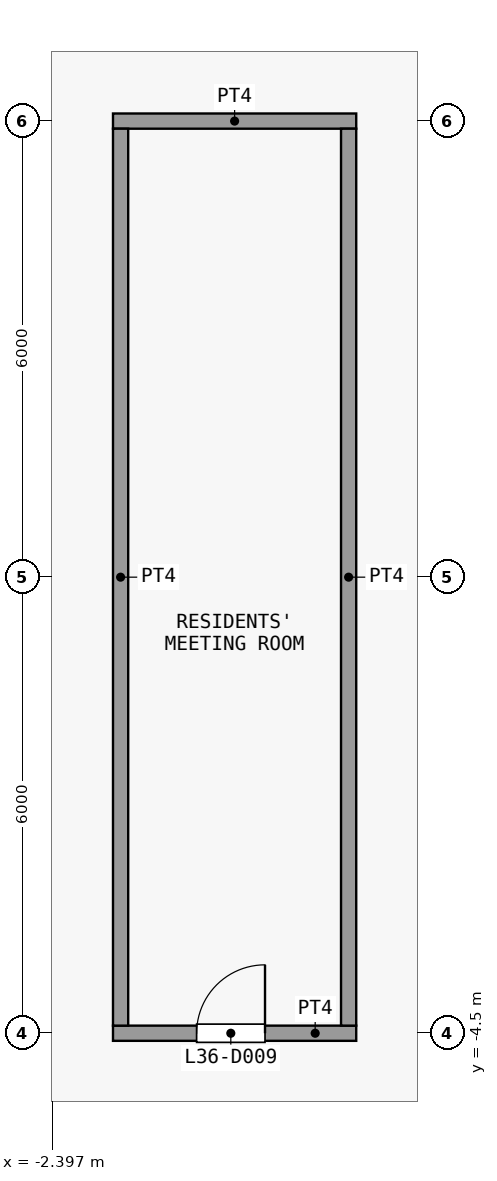
"""IFC4 building model, lengths in metres.
Left out: names, types, materials, properties, quantities, classifications, styles, units other than length and angle.
Written with IfcOpenShell. Run it as: python <this file> out.ifc"""

import sys

from ifc_helpers import new_model, si_unit, direction, frame, frame_2d, origin, place, context, subcontext, project, spatial, rectangle, extrude, element, fill, save


model = new_model("IFC4")
c1 = context("Model", 3, precision=1e-05, world=origin(), true_north=direction((0.0, 1.0)))
c2 = subcontext(c1, "Body", "Model", "MODEL_VIEW")
j1 = project(units=[si_unit("LENGTHUNIT", "METRE"), si_unit("PLANEANGLEUNIT", "RADIAN")], contexts=[c1])
p1 = place(None, origin())
s1 = spatial("IfcSite", under=j1, at=p1, CompositionType="ELEMENT")
p2 = place(p1, origin())
s2 = spatial("IfcBuilding", under=s1, at=p2, CompositionType="ELEMENT")
p3 = place(p2, frame((0.0, 0.0, 149.3)))
s3 = spatial("IfcBuildingStorey", under=s2, at=p3, CompositionType="ELEMENT", Elevation=149.3)
p4 = place(p3, frame((-1.6, -4.5, 0.0), z_axis=(0.0, 0.0, 1.0), x_axis=(1.0, 0.0, 0.0)))
e1 = element("IfcWall", 1, at=p4, inside=s3, PredefinedType="PARTITIONING", context=c2, shape_type="SweptSolid", body=[
    extrude(rectangle(XDim=3.2, YDim=0.2, at=frame_2d((1.6, 0.0))), origin(), (0.0, 0.0, 1.0), 3.3),
])
p5 = place(p4, frame((1.1, 0.0, 0.0)))
e2 = element("IfcOpeningElement", 2, at=p5, cuts=e1, PredefinedType="OPENING", context=c2, shape_type="SweptSolid", body=[
    extrude(rectangle(XDim=0.9, YDim=2.1, at=frame_2d((0.45, 1.05))), frame((0.0, 0.11, 0.0), z_axis=(0.0, -1.0, 0.0), x_axis=(1.0, 0.0, 0.0)), (0.0, 0.0, 1.0), 0.22),
])
p6 = place(p3, frame((-1.6, 7.5, 0.0), z_axis=(0.0, 0.0, 1.0), x_axis=(1.0, 0.0, 0.0)))
e3 = element("IfcWall", 3, at=p6, inside=s3, PredefinedType="PARTITIONING", context=c2, shape_type="SweptSolid", body=[
    extrude(rectangle(XDim=3.2, YDim=0.2, at=frame_2d((1.6, 0.0))), origin(), (0.0, 0.0, 1.0), 3.3),
])
for number, where, z_axis, x_axis in (
    (4, (-1.5, -4.4, 0.0), (0.0, 0.0, 1.0), (0.0, 1.0, 0.0)),
    (5, (1.5, -4.4, 0.0), (0.0, 0.0, 1.0), (0.0, 1.0, 0.0)),
):
    element("IfcWall", number, at=place(p3, frame(where, z_axis=z_axis, x_axis=x_axis)), inside=s3, PredefinedType="PARTITIONING", context=c2, shape_type="SweptSolid", body=[
        extrude(rectangle(XDim=11.8, YDim=0.2, at=frame_2d((5.9, 0.0))), origin(), (0.0, 0.0, 1.0), 3.3),
    ])
p7 = place(p5, origin())
e6 = element("IfcDoor", 6, at=p7, inside=s3, OperationType="SINGLE_SWING_LEFT", PredefinedType="DOOR", context=c2, shape_type="SweptSolid", body=[
    extrude(rectangle(XDim=0.9, YDim=2.1, at=frame_2d((0.45, 1.05))), frame((0.0, 0.025, 0.0), z_axis=(0.0, -1.0, 0.0), x_axis=(1.0, 0.0, 0.0)), (0.0, 0.0, 1.0), 0.05),
])
fill(e2, e6)
save(model, sys.argv[1])
